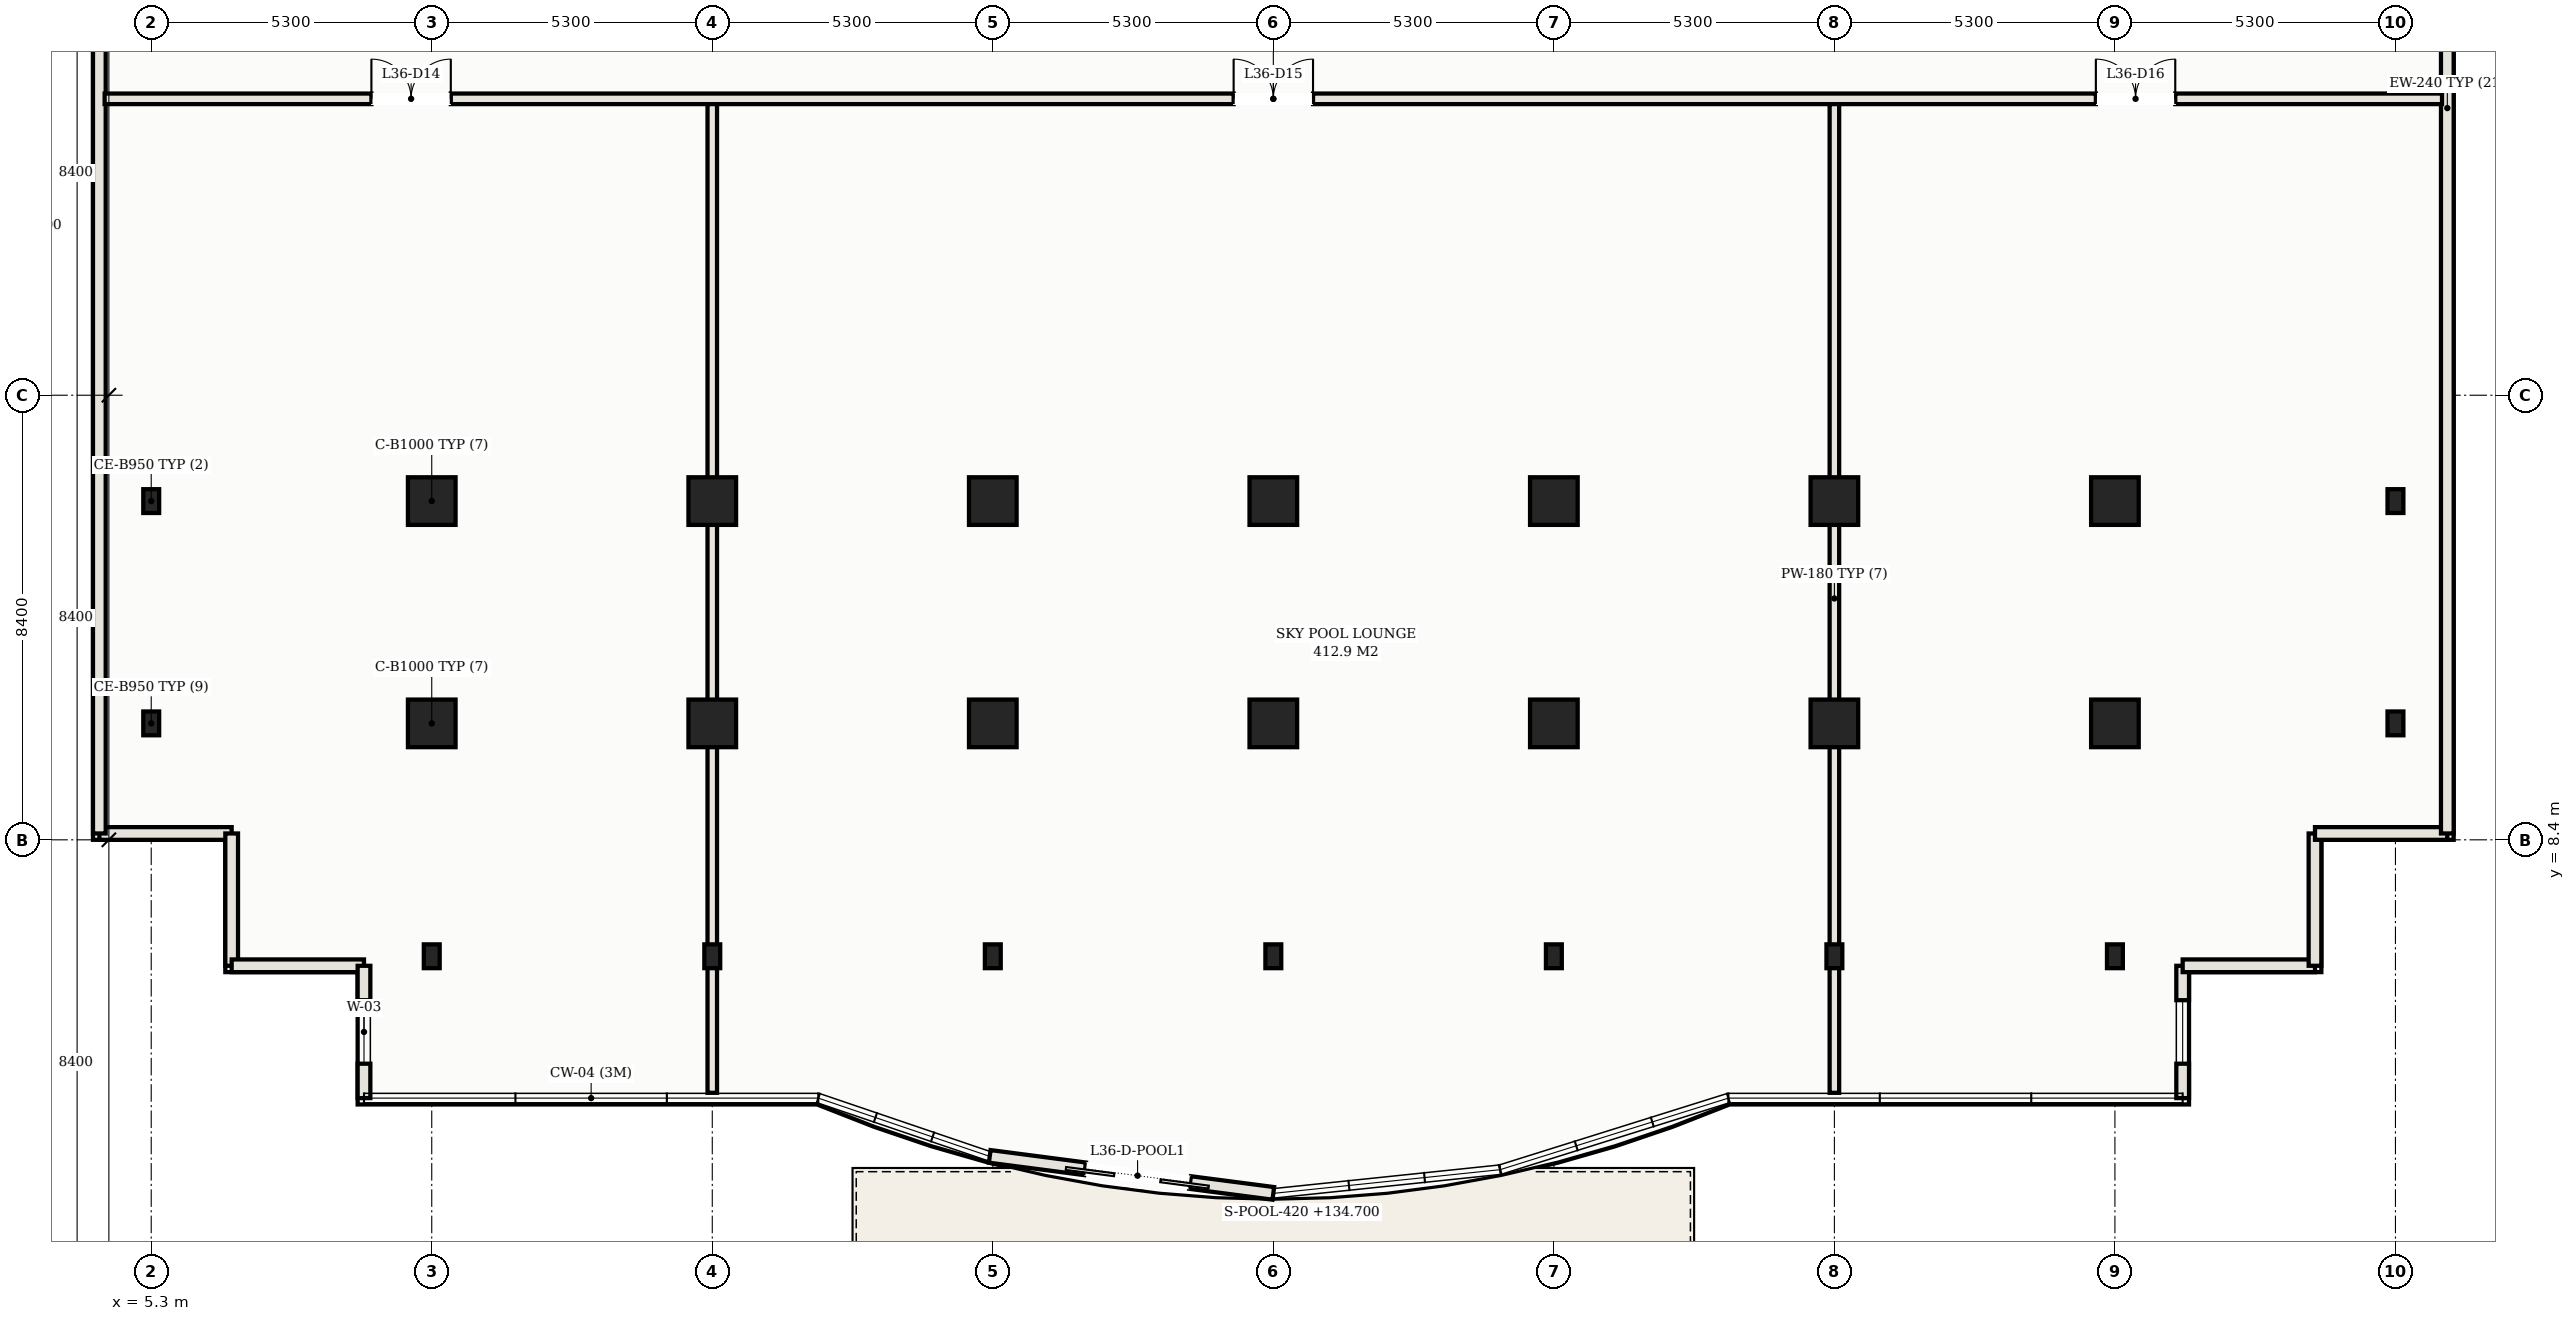
"""IFC4 building model, lengths in metres.
Left out: names, types, materials, properties, quantities, classifications, styles, units other than length and angle.
Written with IfcOpenShell. Run it as: python <this file> out.ifc"""

import sys

from ifc_helpers import new_model, si_unit, direction, frame, frame_2d, origin, origin_2d, place, context, subcontext, project, spatial, rectangle, hollow_rectangle, extrude, element, fill, save


model = new_model("IFC4")
c1 = context("Model", 3, precision=1e-05, world=origin(), true_north=direction((0.0, 1.0)))
c2 = subcontext(c1, "Body", "Model", "MODEL_VIEW")
j1 = project(units=[si_unit("LENGTHUNIT", "METRE"), si_unit("PLANEANGLEUNIT", "RADIAN")], contexts=[c1])
p1 = place(None, origin())
s1 = spatial("IfcSite", under=j1, at=p1, CompositionType="ELEMENT")
p2 = place(p1, origin())
s2 = spatial("IfcBuilding", under=s1, at=p2, CompositionType="ELEMENT")
p3 = place(p2, frame((0.0, 0.0, 134.7)))
s3 = spatial("IfcBuildingStorey", under=s2, at=p3, CompositionType="ELEMENT", Elevation=134.7)
for number, where, z_axis, x_axis in (
    (1, (10.6, 14.8, 0.0), (0.0, 0.0, 1.0), (1.0, 0.0, 0.0)),
    (2, (10.6, 10.6, 0.0), (0.0, 0.0, 1.0), (1.0, 0.0, 0.0)),
    (3, (15.9, 14.8, 0.0), (0.0, 0.0, 1.0), (1.0, 0.0, 0.0)),
    (4, (15.9, 10.6, 0.0), (0.0, 0.0, 1.0), (1.0, 0.0, 0.0)),
    (5, (21.2, 14.8, 0.0), (0.0, 0.0, 1.0), (1.0, 0.0, 0.0)),
    (6, (21.2, 10.6, 0.0), (0.0, 0.0, 1.0), (1.0, 0.0, 0.0)),
    (7, (26.5, 14.8, 0.0), (0.0, 0.0, 1.0), (1.0, 0.0, 0.0)),
    (8, (26.5, 10.6, 0.0), (0.0, 0.0, 1.0), (1.0, 0.0, 0.0)),
    (9, (31.8, 14.8, 0.0), (0.0, 0.0, 1.0), (1.0, 0.0, 0.0)),
    (10, (31.8, 10.6, 0.0), (0.0, 0.0, 1.0), (1.0, 0.0, 0.0)),
    (11, (37.1, 14.8, 0.0), (0.0, 0.0, 1.0), (1.0, 0.0, 0.0)),
    (12, (37.1, 10.6, 0.0), (0.0, 0.0, 1.0), (1.0, 0.0, 0.0)),
    (13, (42.4, 14.8, 0.0), (0.0, 0.0, 1.0), (1.0, 0.0, 0.0)),
    (14, (42.4, 10.6, 0.0), (0.0, 0.0, 1.0), (1.0, 0.0, 0.0)),
):
    element("IfcColumn", number, at=place(p3, frame(where, z_axis=z_axis, x_axis=x_axis)), inside=s3, PredefinedType="COLUMN", context=c2, shape_type="SweptSolid", body=[
        extrude(hollow_rectangle(XDim=0.9, YDim=0.9, WallThickness=0.032, at=origin_2d()), origin(), (0.0, 0.0, 1.0), 4.5),
    ])
for number, where, z_axis, x_axis in (
    (15, (10.6, 6.2, 0.0), (0.0, 0.0, 1.0), (1.0, 0.0, 0.0)),
    (16, (15.9, 6.2, 0.0), (0.0, 0.0, 1.0), (1.0, 0.0, 0.0)),
):
    element("IfcColumn", number, at=place(p3, frame(where, z_axis=z_axis, x_axis=x_axis)), inside=s3, PredefinedType="COLUMN", context=c2, shape_type="SweptSolid", body=[
        extrude(hollow_rectangle(XDim=0.3, YDim=0.45, WallThickness=0.016, at=origin_2d()), origin(), (0.0, 0.0, 1.0), 4.5),
    ])
for number, where, z_axis, x_axis in (
    (17, (21.2, 6.2, -0.43), (0.0, 0.0, 1.0), (1.0, 0.0, 0.0)),
    (18, (26.5, 6.2, -0.43), (0.0, 0.0, 1.0), (1.0, 0.0, 0.0)),
    (19, (31.8, 6.2, -0.43), (0.0, 0.0, 1.0), (1.0, 0.0, 0.0)),
):
    element("IfcColumn", number, at=place(p3, frame(where, z_axis=z_axis, x_axis=x_axis)), inside=s3, PredefinedType="COLUMN", context=c2, shape_type="SweptSolid", body=[
        extrude(hollow_rectangle(XDim=0.3, YDim=0.45, WallThickness=0.016, at=origin_2d()), origin(), (0.0, 0.0, 1.0), 4.93),
    ])
for number, where, z_axis, x_axis in (
    (20, (37.1, 6.2, 0.0), (0.0, 0.0, 1.0), (1.0, 0.0, 0.0)),
    (21, (42.4, 6.2, 0.0), (0.0, 0.0, 1.0), (1.0, 0.0, 0.0)),
    (22, (5.3, 10.6, 0.0), (0.0, 0.0, 1.0), (1.0, 0.0, 0.0)),
    (23, (5.3, 14.8, 0.0), (0.0, 0.0, 1.0), (1.0, 0.0, 0.0)),
    (24, (47.7, 10.6, 0.0), (0.0, 0.0, 1.0), (1.0, 0.0, 0.0)),
    (25, (47.7, 14.8, 0.0), (0.0, 0.0, 1.0), (1.0, 0.0, 0.0)),
):
    element("IfcColumn", number, at=place(p3, frame(where, z_axis=z_axis, x_axis=x_axis)), inside=s3, PredefinedType="COLUMN", context=c2, shape_type="SweptSolid", body=[
        extrude(hollow_rectangle(XDim=0.3, YDim=0.45, WallThickness=0.016, at=origin_2d()), origin(), (0.0, 0.0, 1.0), 4.5),
    ])
for number, where, z_axis, x_axis in (
    (26, (4.32, 8.52, 0.0), (0.0, 0.0, 1.0), (1.0, 0.0, 0.0)),
    (27, (6.82, 8.52, 0.0), (0.0, 0.0, 1.0), (0.0, -1.0, 0.0)),
    (28, (6.82, 6.02, 0.0), (0.0, 0.0, 1.0), (1.0, 0.0, 0.0)),
):
    element("IfcWall", number, at=place(p3, frame(where, z_axis=z_axis, x_axis=x_axis)), inside=s3, PredefinedType="SOLIDWALL", context=c2, shape_type="SweptSolid", body=[
        extrude(rectangle(XDim=2.5, YDim=0.24, at=frame_2d((1.25, 0.0))), origin(), (0.0, 0.0, 1.0), 4.3),
    ])
p4 = place(p3, frame((9.32, 6.02, 0.0), z_axis=(0.0, 0.0, 1.0), x_axis=(0.0, -1.0, 0.0)))
e29 = element("IfcWall", 29, at=p4, inside=s3, PredefinedType="SOLIDWALL", context=c2, shape_type="SweptSolid", body=[
    extrude(rectangle(XDim=2.5, YDim=0.24, at=frame_2d((1.25, 0.0))), origin(), (0.0, 0.0, 1.0), 4.3),
])
p5 = place(p4, frame((0.65, 0.0, 0.75)))
e30 = element("IfcOpeningElement", 30, at=p5, cuts=e29, PredefinedType="OPENING", context=c2, shape_type="SweptSolid", body=[
    extrude(rectangle(XDim=1.2, YDim=1.5, at=frame_2d((0.6, 0.75))), frame((0.0, 0.13, 0.0), z_axis=(0.0, -1.0, 0.0), x_axis=(1.0, 0.0, 0.0)), (0.0, 0.0, 1.0), 0.26),
])
p6 = place(p3, frame((21.142, 2.419, 0.0), z_axis=(0.0, 0.0, 1.0), x_axis=(0.991597639478, -0.129360432053, 0.0)))
e31 = element("IfcWall", 31, at=p6, inside=s3, PredefinedType="SOLIDWALL", context=c2, shape_type="SweptSolid", body=[
    extrude(rectangle(XDim=5.403, YDim=0.24, at=frame_2d((2.702, 0.0))), origin(), (0.0, 0.0, 1.0), 4.3),
])
p7 = place(p6, frame((1.817, 0.0, 0.0)))
e32 = element("IfcOpeningElement", 32, at=p7, cuts=e31, PredefinedType="OPENING", context=c2, shape_type="SweptSolid", body=[
    extrude(rectangle(XDim=2.0, YDim=2.3, at=frame_2d((1.0, 1.15))), frame((0.0, 0.13, 0.0), z_axis=(0.0, -1.0, 0.0), x_axis=(1.0, 0.0, 0.0)), (0.0, 0.0, 1.0), 0.26),
])
p8 = place(p3, frame((43.68, 3.52, 0.0), z_axis=(0.0, 0.0, 1.0), x_axis=(0.0, 1.0, 0.0)))
e33 = element("IfcWall", 33, at=p8, inside=s3, PredefinedType="SOLIDWALL", context=c2, shape_type="SweptSolid", body=[
    extrude(rectangle(XDim=2.5, YDim=0.24, at=frame_2d((1.25, 0.0))), origin(), (0.0, 0.0, 1.0), 4.3),
])
p9 = place(p8, frame((0.65, 0.0, 0.75)))
e34 = element("IfcOpeningElement", 34, at=p9, cuts=e33, PredefinedType="OPENING", context=c2, shape_type="SweptSolid", body=[
    extrude(rectangle(XDim=1.2, YDim=1.5, at=frame_2d((0.6, 0.75))), frame((0.0, 0.13, 0.0), z_axis=(0.0, -1.0, 0.0), x_axis=(1.0, 0.0, 0.0)), (0.0, 0.0, 1.0), 0.26),
])
for number, where, z_axis, x_axis in (
    (35, (43.68, 6.02, 0.0), (0.0, 0.0, 1.0), (1.0, 0.0, 0.0)),
    (36, (46.18, 6.02, 0.0), (0.0, 0.0, 1.0), (0.0, 1.0, 0.0)),
    (37, (46.18, 8.52, 0.0), (0.0, 0.0, 1.0), (1.0, 0.0, 0.0)),
):
    element("IfcWall", number, at=place(p3, frame(where, z_axis=z_axis, x_axis=x_axis)), inside=s3, PredefinedType="SOLIDWALL", context=c2, shape_type="SweptSolid", body=[
        extrude(rectangle(XDim=2.5, YDim=0.24, at=frame_2d((1.25, 0.0))), origin(), (0.0, 0.0, 1.0), 4.3),
    ])
for number, where, z_axis, x_axis in (
    (38, (48.68, 8.52, 0.0), (0.0, 0.0, 1.0), (0.0, 1.0, 0.0)),
    (39, (4.32, 35.93, 0.0), (0.0, 0.0, 1.0), (0.0, -1.0, 0.0)),
):
    element("IfcWall", number, at=place(p3, frame(where, z_axis=z_axis, x_axis=x_axis)), inside=s3, PredefinedType="SOLIDWALL", context=c2, shape_type="SweptSolid", body=[
        extrude(rectangle(XDim=27.41, YDim=0.24, at=frame_2d((13.705, 0.0))), origin(), (0.0, 0.0, 1.0), 4.3),
    ])
p10 = place(p3, frame((4.42, 22.4, 0.0), z_axis=(0.0, 0.0, 1.0), x_axis=(1.0, 0.0, 0.0)))
e40 = element("IfcWall", 40, at=p10, inside=s3, PredefinedType="PARTITIONING", context=c2, shape_type="SweptSolid", body=[
    extrude(rectangle(XDim=44.16, YDim=0.2, at=frame_2d((22.08, 0.0))), origin(), (0.0, 0.0, 1.0), 4.3),
])
p11 = place(p10, frame((5.04, 0.0, 0.0)))
e41 = element("IfcOpeningElement", 41, at=p11, cuts=e40, PredefinedType="OPENING", context=c2, shape_type="SweptSolid", body=[
    extrude(rectangle(XDim=1.5, YDim=2.25, at=frame_2d((0.75, 1.125))), frame((0.0, 0.11, 0.0), z_axis=(0.0, -1.0, 0.0), x_axis=(1.0, 0.0, 0.0)), (0.0, 0.0, 1.0), 0.22),
])
p12 = place(p10, frame((21.33, 0.0, 0.0)))
e42 = element("IfcOpeningElement", 42, at=p12, cuts=e40, PredefinedType="OPENING", context=c2, shape_type="SweptSolid", body=[
    extrude(rectangle(XDim=1.5, YDim=2.25, at=frame_2d((0.75, 1.125))), frame((0.0, 0.11, 0.0), z_axis=(0.0, -1.0, 0.0), x_axis=(1.0, 0.0, 0.0)), (0.0, 0.0, 1.0), 0.22),
])
p13 = place(p10, frame((37.62, 0.0, 0.0)))
e43 = element("IfcOpeningElement", 43, at=p13, cuts=e40, PredefinedType="OPENING", context=c2, shape_type="SweptSolid", body=[
    extrude(rectangle(XDim=1.5, YDim=2.25, at=frame_2d((0.75, 1.125))), frame((0.0, 0.11, 0.0), z_axis=(0.0, -1.0, 0.0), x_axis=(1.0, 0.0, 0.0)), (0.0, 0.0, 1.0), 0.22),
])
for number, where, z_axis, x_axis in (
    (44, (15.9, 3.62, 0.0), (0.0, 0.0, 1.0), (0.0, 1.0, 0.0)),
    (45, (37.1, 3.62, 0.0), (0.0, 0.0, 1.0), (0.0, 1.0, 0.0)),
):
    element("IfcWall", number, at=place(p3, frame(where, z_axis=z_axis, x_axis=x_axis)), inside=s3, PredefinedType="PARTITIONING", context=c2, shape_type="SweptSolid", body=[
        extrude(rectangle(XDim=18.68, YDim=0.18, at=frame_2d((9.34, 0.0))), origin(), (0.0, 0.0, 1.0), 3.595),
    ])
p14 = place(p5, origin())
e46 = element("IfcWindow", 46, at=p14, inside=s3, PartitioningType="SINGLE_PANEL", PredefinedType="WINDOW", context=c2, shape_type="SweptSolid", body=[
    extrude(rectangle(XDim=1.2, YDim=1.5, at=frame_2d((0.6, 0.75))), frame((0.0, 0.03, 0.0), z_axis=(0.0, -1.0, 0.0), x_axis=(1.0, 0.0, 0.0)), (0.0, 0.0, 1.0), 0.06),
])
fill(e30, e46)
p15 = place(p7, frame((2.0, 0.0, 0.0), z_axis=(0.0, 0.0, 1.0), x_axis=(-1.0, 0.0, 0.0)))
e47 = element("IfcDoor", 47, at=p15, inside=s3, OperationType="DOUBLE_DOOR_SLIDING", PredefinedType="DOOR", context=c2, shape_type="SweptSolid", body=[
    extrude(rectangle(XDim=2.0, YDim=2.3, at=frame_2d((1.0, 1.15))), frame((0.0, 0.025, 0.0), z_axis=(0.0, -1.0, 0.0), x_axis=(1.0, 0.0, 0.0)), (0.0, 0.0, 1.0), 0.05),
])
fill(e32, e47)
p16 = place(p9, origin())
e48 = element("IfcWindow", 48, at=p16, inside=s3, PartitioningType="SINGLE_PANEL", PredefinedType="WINDOW", context=c2, shape_type="SweptSolid", body=[
    extrude(rectangle(XDim=1.2, YDim=1.5, at=frame_2d((0.6, 0.75))), frame((0.0, 0.03, 0.0), z_axis=(0.0, -1.0, 0.0), x_axis=(1.0, 0.0, 0.0)), (0.0, 0.0, 1.0), 0.06),
])
fill(e34, e48)
p17 = place(p11, origin())
e49 = element("IfcDoor", 49, at=p17, inside=s3, OperationType="DOUBLE_DOOR_SINGLE_SWING", PredefinedType="DOOR", context=c2, shape_type="SweptSolid", body=[
    extrude(rectangle(XDim=1.5, YDim=2.25, at=frame_2d((0.75, 1.125))), frame((0.0, 0.025, 0.0), z_axis=(0.0, -1.0, 0.0), x_axis=(1.0, 0.0, 0.0)), (0.0, 0.0, 1.0), 0.05),
])
fill(e41, e49)
p18 = place(p12, origin())
e50 = element("IfcDoor", 50, at=p18, inside=s3, OperationType="DOUBLE_DOOR_SINGLE_SWING", PredefinedType="DOOR", context=c2, shape_type="SweptSolid", body=[
    extrude(rectangle(XDim=1.5, YDim=2.25, at=frame_2d((0.75, 1.125))), frame((0.0, 0.025, 0.0), z_axis=(0.0, -1.0, 0.0), x_axis=(1.0, 0.0, 0.0)), (0.0, 0.0, 1.0), 0.05),
])
fill(e42, e50)
p19 = place(p13, origin())
e51 = element("IfcDoor", 51, at=p19, inside=s3, OperationType="DOUBLE_DOOR_SINGLE_SWING", PredefinedType="DOOR", context=c2, shape_type="SweptSolid", body=[
    extrude(rectangle(XDim=1.5, YDim=2.25, at=frame_2d((0.75, 1.125))), frame((0.0, 0.025, 0.0), z_axis=(0.0, -1.0, 0.0), x_axis=(1.0, 0.0, 0.0)), (0.0, 0.0, 1.0), 0.05),
])
fill(e43, e51)
save(model, sys.argv[1])
